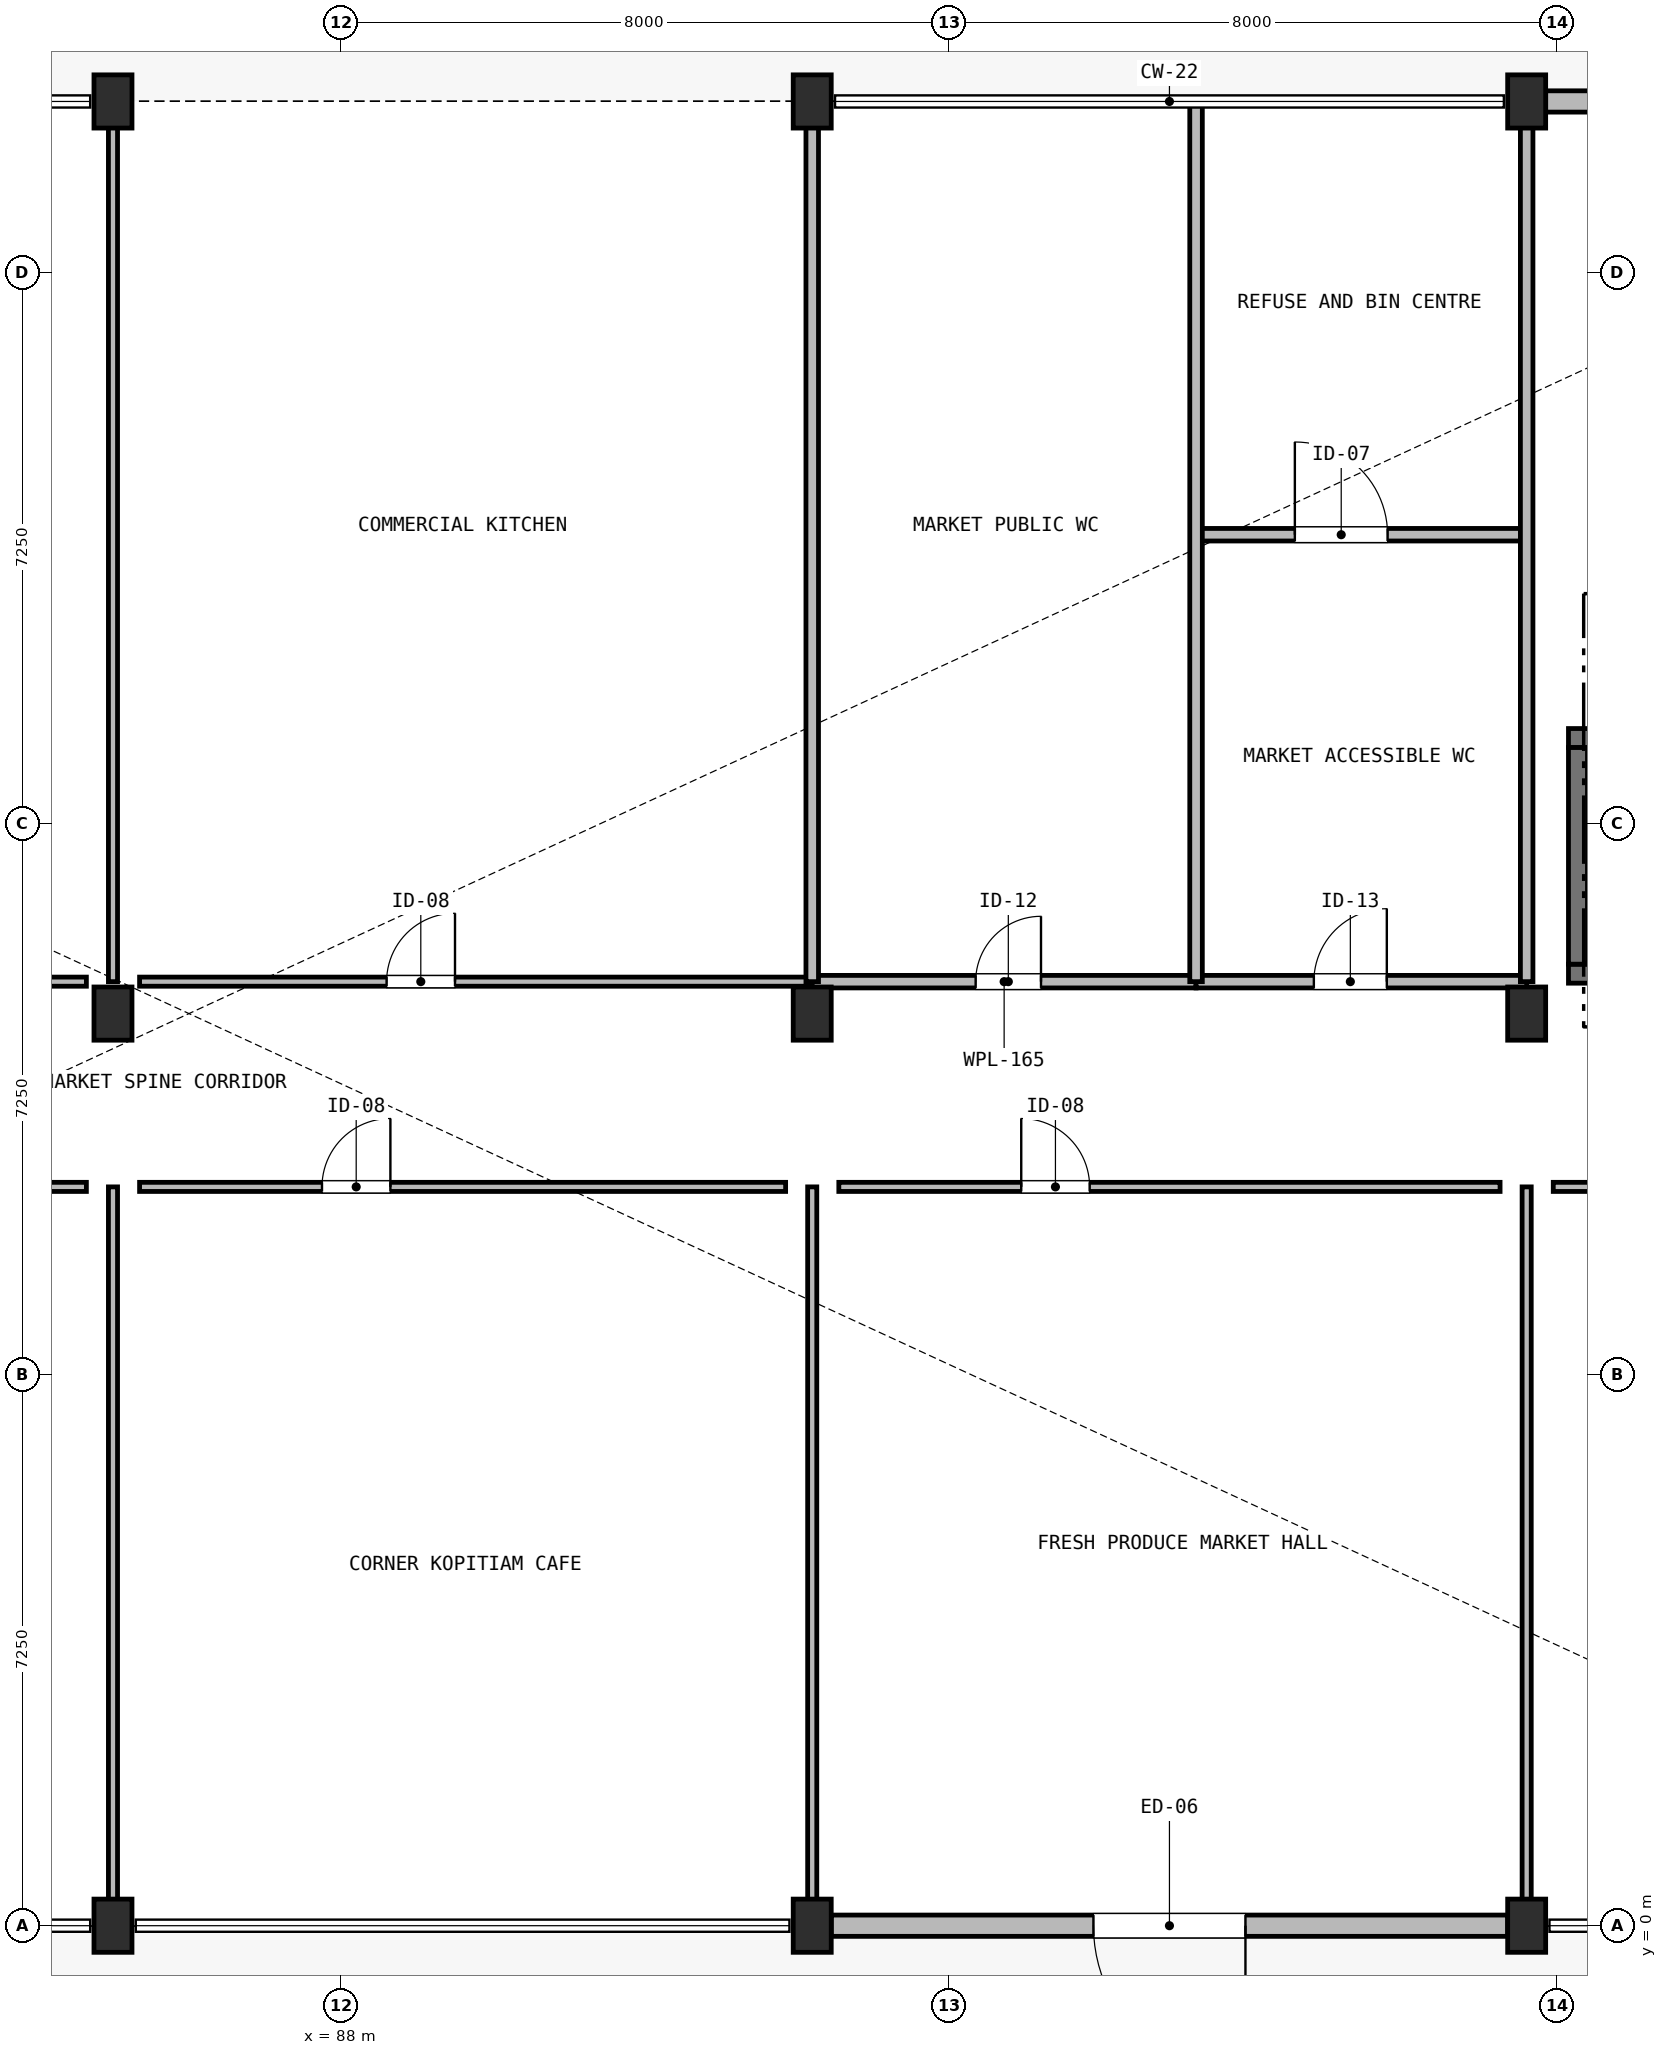
"""IFC4 building model, lengths in metres.
Left out: names, types, materials, properties, quantities, classifications, styles, units other than length and angle.
Written with IfcOpenShell. Run it as: python <this file> out.ifc"""

import sys

from ifc_helpers import new_model, si_unit, direction, frame, frame_2d, origin, origin_2d, place, context, subcontext, project, spatial, rectangle, extrude, element, fill, save


model = new_model("IFC4")
c1 = context("Model", 3, precision=1e-05, world=origin(), true_north=direction((0.0, 1.0)))
c2 = subcontext(c1, "Body", "Model", "MODEL_VIEW")
j1 = project(units=[si_unit("LENGTHUNIT", "METRE"), si_unit("PLANEANGLEUNIT", "RADIAN")], contexts=[c1])
p1 = place(None, origin())
s1 = spatial("IfcSite", under=j1, at=p1, CompositionType="ELEMENT")
p2 = place(p1, origin())
s2 = spatial("IfcBuilding", under=s1, at=p2, CompositionType="ELEMENT")
p3 = place(p2, origin())
s3 = spatial("IfcBuildingStorey", under=s2, at=p3, CompositionType="ELEMENT", Elevation=0.0)
p4 = place(p3, frame((104.15, 12.525, 0.0), z_axis=(0.0, 0.0, 1.0), x_axis=(1.0, 0.0, 0.0)))
e1 = element("IfcWall", 1, at=p4, inside=s3, PredefinedType="SHEAR", context=c2, shape_type="SweptSolid", body=[
    extrude(rectangle(XDim=7.3, YDim=0.25, at=frame_2d((3.65, 0.0))), origin(), (0.0, 0.0, 1.0), 4.5),
])
p5 = place(p4, frame((0.45, 0.0, 0.0)))
e2 = element("IfcOpeningElement", 2, at=p5, cuts=e1, PredefinedType="OPENING", context=c2, shape_type="SweptSolid", body=[
    extrude(rectangle(XDim=1.05, YDim=2.15, at=frame_2d((0.525, 1.075))), frame((0.0, 0.14, 0.0), z_axis=(0.0, -1.0, 0.0), x_axis=(1.0, 0.0, 0.0)), (0.0, 0.0, 1.0), 0.28),
])
p6 = place(p3, frame((104.15, 15.625, 0.0), z_axis=(0.0, 0.0, 1.0), x_axis=(1.0, 0.0, 0.0)))
e3 = element("IfcWall", 3, at=p6, inside=s3, PredefinedType="SHEAR", context=c2, shape_type="SweptSolid", body=[
    extrude(rectangle(XDim=7.3, YDim=0.25, at=frame_2d((3.65, 0.0))), origin(), (0.0, 0.0, 1.0), 4.5),
])
p7 = place(p6, frame((0.45, 0.0, 0.0)))
e4 = element("IfcOpeningElement", 4, at=p7, cuts=e3, PredefinedType="OPENING", context=c2, shape_type="SweptSolid", body=[
    extrude(rectangle(XDim=1.12, YDim=2.15, at=frame_2d((0.56, 1.075))), frame((0.0, 0.14, 0.0), z_axis=(0.0, -1.0, 0.0), x_axis=(1.0, 0.0, 0.0)), (0.0, 0.0, 1.0), 0.28),
])
p8 = place(p3, frame((104.275, 12.65, 0.0), z_axis=(0.0, 0.0, 1.0), x_axis=(0.0, 1.0, 0.0)))
e5 = element("IfcWall", 5, at=p8, inside=s3, PredefinedType="SHEAR", context=c2, shape_type="SweptSolid", body=[
    extrude(rectangle(XDim=2.85, YDim=0.25, at=frame_2d((1.425, 0.0))), origin(), (0.0, 0.0, 1.0), 4.5),
])
for number, where, z_axis, x_axis in (
    (6, (85.0, 0.0, 0.0), (0.0, 0.0, 1.0), (1.0, 0.0, 0.0)),
    (7, (85.0, 12.0, 0.0), (0.0, 0.0, 1.0), (1.0, 0.0, 0.0)),
    (8, (85.0, 24.0, 0.0), (0.0, 0.0, 1.0), (1.0, 0.0, 0.0)),
    (9, (94.2, 0.0, 0.0), (0.0, 0.0, 1.0), (1.0, 0.0, 0.0)),
    (10, (94.2, 12.0, 0.0), (0.0, 0.0, 1.0), (1.0, 0.0, 0.0)),
    (11, (94.2, 24.0, 0.0), (0.0, 0.0, 1.0), (1.0, 0.0, 0.0)),
    (12, (103.6, 0.0, 0.0), (0.0, 0.0, 1.0), (1.0, 0.0, 0.0)),
    (13, (103.6, 12.0, 0.0), (0.0, 0.0, 1.0), (1.0, 0.0, 0.0)),
    (14, (103.6, 24.0, 0.0), (0.0, 0.0, 1.0), (1.0, 0.0, 0.0)),
):
    element("IfcColumn", number, at=place(p3, frame(where, z_axis=z_axis, x_axis=x_axis)), inside=s3, PredefinedType="COLUMN", context=c2, shape_type="SweptSolid", body=[
        extrude(rectangle(XDim=0.5, YDim=0.7, at=origin_2d()), origin(), (0.0, 0.0, 1.0), 4.5),
    ])
p9 = place(p3, frame((103.35, 0.0, 0.0), z_axis=(0.0, 0.0, 1.0), x_axis=(-1.0, 0.0, 0.0)))
e15 = element("IfcWall", 15, at=p9, inside=s3, PredefinedType="SOLIDWALL", context=c2, shape_type="SweptSolid", body=[
    extrude(rectangle(XDim=8.9, YDim=0.28, at=frame_2d((4.45, 0.0))), origin(), (0.0, 0.0, 1.0), 3.59),
])
p10 = place(p9, frame((3.45, 0.0, 0.0)))
e16 = element("IfcOpeningElement", 16, at=p10, cuts=e15, PredefinedType="OPENING", context=c2, shape_type="SweptSolid", body=[
    extrude(rectangle(XDim=2.0, YDim=2.45, at=frame_2d((1.0, 1.225))), frame((0.0, 0.155, 0.0), z_axis=(0.0, -1.0, 0.0), x_axis=(1.0, 0.0, 0.0)), (0.0, 0.0, 1.0), 0.31),
])
p11 = place(p3, frame((103.85, 24.0, 0.0), z_axis=(0.0, 0.0, 1.0), x_axis=(1.0, 0.0, 0.0)))
e17 = element("IfcWall", 17, at=p11, inside=s3, PredefinedType="SOLIDWALL", context=c2, shape_type="SweptSolid", body=[
    extrude(rectangle(XDim=7.9, YDim=0.28, at=frame_2d((3.95, 0.0))), origin(), (0.0, 0.0, 1.0), 3.59),
])
p12 = place(p11, frame((3.4, 0.0, 0.0)))
e18 = element("IfcOpeningElement", 18, at=p12, cuts=e17, PredefinedType="OPENING", context=c2, shape_type="SweptSolid", body=[
    extrude(rectangle(XDim=1.1, YDim=2.15, at=frame_2d((0.55, 1.075))), frame((0.0, 0.155, 0.0), z_axis=(0.0, -1.0, 0.0), x_axis=(1.0, 0.0, 0.0)), (0.0, 0.0, 1.0), 0.31),
])
p13 = place(p3, frame((76.15, 9.72, 0.0), z_axis=(0.0, 0.0, 1.0), x_axis=(1.0, 0.0, 0.0)))
e19 = element("IfcWall", 19, at=p13, inside=s3, PredefinedType="PARTITIONING", context=c2, shape_type="SweptSolid", body=[
    extrude(rectangle(XDim=8.5, YDim=0.12, at=frame_2d((4.25, 0.0))), origin(), (0.0, 0.0, 1.0), 4.23),
])
p14 = place(p13, frame((2.4, 0.0, 0.0)))
e20 = element("IfcOpeningElement", 20, at=p14, cuts=e19, PredefinedType="OPENING", context=c2, shape_type="SweptSolid", body=[
    extrude(rectangle(XDim=0.88, YDim=2.1, at=frame_2d((0.44, 1.05))), frame((0.0, 0.075, 0.0), z_axis=(0.0, -1.0, 0.0), x_axis=(1.0, 0.0, 0.0)), (0.0, 0.0, 1.0), 0.15),
])
p15 = place(p3, frame((85.35, 9.72, 0.0), z_axis=(0.0, 0.0, 1.0), x_axis=(1.0, 0.0, 0.0)))
e21 = element("IfcWall", 21, at=p15, inside=s3, PredefinedType="PARTITIONING", context=c2, shape_type="SweptSolid", body=[
    extrude(rectangle(XDim=8.5, YDim=0.12, at=frame_2d((4.25, 0.0))), origin(), (0.0, 0.0, 1.0), 4.23),
])
p16 = place(p15, frame((2.4, 0.0, 0.0)))
e22 = element("IfcOpeningElement", 22, at=p16, cuts=e21, PredefinedType="OPENING", context=c2, shape_type="SweptSolid", body=[
    extrude(rectangle(XDim=0.9, YDim=2.1, at=frame_2d((0.45, 1.05))), frame((0.0, 0.075, 0.0), z_axis=(0.0, -1.0, 0.0), x_axis=(1.0, 0.0, 0.0)), (0.0, 0.0, 1.0), 0.15),
])
p17 = place(p3, frame((94.55, 9.72, 0.0), z_axis=(0.0, 0.0, 1.0), x_axis=(1.0, 0.0, 0.0)))
e23 = element("IfcWall", 23, at=p17, inside=s3, PredefinedType="PARTITIONING", context=c2, shape_type="SweptSolid", body=[
    extrude(rectangle(XDim=8.7, YDim=0.12, at=frame_2d((4.35, 0.0))), origin(), (0.0, 0.0, 1.0), 4.23),
])
p18 = place(p17, frame((2.4, 0.0, 0.0)))
e24 = element("IfcOpeningElement", 24, at=p18, cuts=e23, PredefinedType="OPENING", context=c2, shape_type="SweptSolid", body=[
    extrude(rectangle(XDim=0.9, YDim=2.1, at=frame_2d((0.45, 1.05))), frame((0.0, 0.075, 0.0), z_axis=(0.0, -1.0, 0.0), x_axis=(1.0, 0.0, 0.0)), (0.0, 0.0, 1.0), 0.15),
])
p19 = place(p3, frame((103.95, 9.72, 0.0), z_axis=(0.0, 0.0, 1.0), x_axis=(1.0, 0.0, 0.0)))
e25 = element("IfcWall", 25, at=p19, inside=s3, PredefinedType="PARTITIONING", context=c2, shape_type="SweptSolid", body=[
    extrude(rectangle(XDim=7.9, YDim=0.12, at=frame_2d((3.95, 0.0))), origin(), (0.0, 0.0, 1.0), 4.23),
])
p20 = place(p19, frame((2.4, 0.0, 0.0)))
e26 = element("IfcOpeningElement", 26, at=p20, cuts=e25, PredefinedType="OPENING", context=c2, shape_type="SweptSolid", body=[
    extrude(rectangle(XDim=0.88, YDim=2.1, at=frame_2d((0.44, 1.05))), frame((0.0, 0.075, 0.0), z_axis=(0.0, -1.0, 0.0), x_axis=(1.0, 0.0, 0.0)), (0.0, 0.0, 1.0), 0.15),
])
for number, where, z_axis, x_axis in (
    (27, (85.0, 0.12, 0.0), (0.0, 0.0, 1.0), (0.0, 1.0, 0.0)),
    (28, (94.2, 0.12, 0.0), (0.0, 0.0, 1.0), (0.0, 1.0, 0.0)),
    (29, (103.6, 0.12, 0.0), (0.0, 0.0, 1.0), (0.0, 1.0, 0.0)),
):
    element("IfcWall", number, at=place(p3, frame(where, z_axis=z_axis, x_axis=x_axis)), inside=s3, PredefinedType="PARTITIONING", context=c2, shape_type="SweptSolid", body=[
        extrude(rectangle(XDim=9.6, YDim=0.12, at=frame_2d((4.8, 0.0))), origin(), (0.0, 0.0, 1.0), 3.6),
    ])
p21 = place(p3, frame((68.4, 12.42, 0.0), z_axis=(0.0, 0.0, 1.0), x_axis=(1.0, 0.0, 0.0)))
e30 = element("IfcWall", 30, at=p21, inside=s3, PredefinedType="PARTITIONING", context=c2, shape_type="SweptSolid", body=[
    extrude(rectangle(XDim=16.25, YDim=0.12, at=frame_2d((8.125, 0.0))), origin(), (0.0, 0.0, 1.0), 4.23),
])
p22 = place(p21, frame((5.4, 0.0, 0.0)))
e31 = element("IfcOpeningElement", 31, at=p22, cuts=e30, PredefinedType="OPENING", context=c2, shape_type="SweptSolid", body=[
    extrude(rectangle(XDim=1.15, YDim=2.15, at=frame_2d((0.575, 1.075))), frame((0.0, 0.075, 0.0), z_axis=(0.0, -1.0, 0.0), x_axis=(1.0, 0.0, 0.0)), (0.0, 0.0, 1.0), 0.15),
])
p23 = place(p3, frame((85.35, 12.42, 0.0), z_axis=(0.0, 0.0, 1.0), x_axis=(1.0, 0.0, 0.0)))
e32 = element("IfcWall", 32, at=p23, inside=s3, PredefinedType="PARTITIONING", context=c2, shape_type="SweptSolid", body=[
    extrude(rectangle(XDim=8.85, YDim=0.12, at=frame_2d((4.425, 0.0))), origin(), (0.0, 0.0, 1.0), 4.23),
])
p24 = place(p23, frame((3.25, 0.0, 0.0)))
e33 = element("IfcOpeningElement", 33, at=p24, cuts=e32, PredefinedType="OPENING", context=c2, shape_type="SweptSolid", body=[
    extrude(rectangle(XDim=0.9, YDim=2.1, at=frame_2d((0.45, 1.05))), frame((0.0, 0.075, 0.0), z_axis=(0.0, -1.0, 0.0), x_axis=(1.0, 0.0, 0.0)), (0.0, 0.0, 1.0), 0.15),
])
p25 = place(p3, frame((94.2, 12.42, 0.0), z_axis=(0.0, 0.0, 1.0), x_axis=(1.0, 0.0, 0.0)))
e34 = element("IfcWall", 34, at=p25, inside=s3, PredefinedType="PLUMBINGWALL", context=c2, shape_type="SweptSolid", body=[
    extrude(rectangle(XDim=5.05, YDim=0.165, at=frame_2d((2.525, 0.0))), origin(), (0.0, 0.0, 1.0), 4.23),
])
p26 = place(p25, frame((2.15, 0.0, 0.0)))
e35 = element("IfcOpeningElement", 35, at=p26, cuts=e34, PredefinedType="OPENING", context=c2, shape_type="SweptSolid", body=[
    extrude(rectangle(XDim=0.86, YDim=2.1, at=frame_2d((0.43, 1.05))), frame((0.0, 0.097, 0.0), z_axis=(0.0, -1.0, 0.0), x_axis=(1.0, 0.0, 0.0)), (0.0, 0.0, 1.0), 0.195),
])
p27 = place(p3, frame((99.25, 12.42, 0.0), z_axis=(0.0, 0.0, 1.0), x_axis=(1.0, 0.0, 0.0)))
e36 = element("IfcWall", 36, at=p27, inside=s3, PredefinedType="PLUMBINGWALL", context=c2, shape_type="SweptSolid", body=[
    extrude(rectangle(XDim=4.35, YDim=0.165, at=frame_2d((2.175, 0.0))), origin(), (0.0, 0.0, 1.0), 4.23),
])
p28 = place(p27, frame((1.55, 0.0, 0.0)))
e37 = element("IfcOpeningElement", 37, at=p28, cuts=e36, PredefinedType="OPENING", context=c2, shape_type="SweptSolid", body=[
    extrude(rectangle(XDim=0.96, YDim=2.12, at=frame_2d((0.48, 1.06))), frame((0.0, 0.097, 0.0), z_axis=(0.0, -1.0, 0.0), x_axis=(1.0, 0.0, 0.0)), (0.0, 0.0, 1.0), 0.195),
])
p29 = place(p3, frame((99.25, 18.3, 0.0), z_axis=(0.0, 0.0, 1.0), x_axis=(1.0, 0.0, 0.0)))
e38 = element("IfcWall", 38, at=p29, inside=s3, PredefinedType="PLUMBINGWALL", context=c2, shape_type="SweptSolid", body=[
    extrude(rectangle(XDim=4.35, YDim=0.165, at=frame_2d((2.175, 0.0))), origin(), (0.0, 0.0, 1.0), 4.23),
])
p30 = place(p29, frame((1.3, 0.0, 0.0)))
e39 = element("IfcOpeningElement", 39, at=p30, cuts=e38, PredefinedType="OPENING", context=c2, shape_type="SweptSolid", body=[
    extrude(rectangle(XDim=1.22, YDim=2.15, at=frame_2d((0.61, 1.075))), frame((0.0, 0.097, 0.0), z_axis=(0.0, -1.0, 0.0), x_axis=(1.0, 0.0, 0.0)), (0.0, 0.0, 1.0), 0.195),
])
p31 = place(p3, frame((85.0, 12.42, 0.0), z_axis=(0.0, 0.0, 1.0), x_axis=(0.0, 1.0, 0.0)))
e40 = element("IfcWall", 40, at=p31, inside=s3, PredefinedType="PARTITIONING", context=c2, shape_type="SweptSolid", body=[
    extrude(rectangle(XDim=11.54, YDim=0.12, at=frame_2d((5.77, 0.0))), origin(), (0.0, 0.0, 1.0), 3.6),
])
p32 = place(p3, frame((94.2, 12.42, 0.0), z_axis=(0.0, 0.0, 1.0), x_axis=(0.0, 1.0, 0.0)))
e41 = element("IfcWall", 41, at=p32, inside=s3, PredefinedType="PLUMBINGWALL", context=c2, shape_type="SweptSolid", body=[
    extrude(rectangle(XDim=11.54, YDim=0.165, at=frame_2d((5.77, 0.0))), origin(), (0.0, 0.0, 1.0), 3.6),
])
p33 = place(p3, frame((99.25, 12.42, 0.0), z_axis=(0.0, 0.0, 1.0), x_axis=(0.0, 1.0, 0.0)))
e42 = element("IfcWall", 42, at=p33, inside=s3, PredefinedType="PLUMBINGWALL", context=c2, shape_type="SweptSolid", body=[
    extrude(rectangle(XDim=11.54, YDim=0.165, at=frame_2d((5.77, 0.0))), origin(), (0.0, 0.0, 1.0), 4.23),
])
p34 = place(p3, frame((103.6, 12.42, 0.0), z_axis=(0.0, 0.0, 1.0), x_axis=(0.0, 1.0, 0.0)))
e43 = element("IfcWall", 43, at=p34, inside=s3, PredefinedType="PLUMBINGWALL", context=c2, shape_type="SweptSolid", body=[
    extrude(rectangle(XDim=11.54, YDim=0.165, at=frame_2d((5.77, 0.0))), origin(), (0.0, 0.0, 1.0), 3.6),
])
p35 = place(p10, origin())
e44 = element("IfcDoor", 44, at=p35, inside=s3, OperationType="DOUBLE_DOOR_SINGLE_SWING", PredefinedType="DOOR", context=c2, shape_type="SweptSolid", body=[
    extrude(rectangle(XDim=2.0, YDim=2.45, at=frame_2d((1.0, 1.225))), frame((0.0, 0.025, 0.0), z_axis=(0.0, -1.0, 0.0), x_axis=(1.0, 0.0, 0.0)), (0.0, 0.0, 1.0), 0.05),
])
fill(e16, e44)
p36 = place(p16, origin())
e45 = element("IfcDoor", 45, at=p36, inside=s3, OperationType="SINGLE_SWING_RIGHT", PredefinedType="DOOR", context=c2, shape_type="SweptSolid", body=[
    extrude(rectangle(XDim=0.9, YDim=2.1, at=frame_2d((0.45, 1.05))), frame((0.0, 0.025, 0.0), z_axis=(0.0, -1.0, 0.0), x_axis=(1.0, 0.0, 0.0)), (0.0, 0.0, 1.0), 0.05),
])
fill(e22, e45)
p37 = place(p18, origin())
e46 = element("IfcDoor", 46, at=p37, inside=s3, OperationType="SINGLE_SWING_LEFT", PredefinedType="DOOR", context=c2, shape_type="SweptSolid", body=[
    extrude(rectangle(XDim=0.9, YDim=2.1, at=frame_2d((0.45, 1.05))), frame((0.0, 0.025, 0.0), z_axis=(0.0, -1.0, 0.0), x_axis=(1.0, 0.0, 0.0)), (0.0, 0.0, 1.0), 0.05),
])
fill(e24, e46)
p38 = place(p24, origin())
e47 = element("IfcDoor", 47, at=p38, inside=s3, OperationType="SINGLE_SWING_RIGHT", PredefinedType="DOOR", context=c2, shape_type="SweptSolid", body=[
    extrude(rectangle(XDim=0.9, YDim=2.1, at=frame_2d((0.45, 1.05))), frame((0.0, 0.025, 0.0), z_axis=(0.0, -1.0, 0.0), x_axis=(1.0, 0.0, 0.0)), (0.0, 0.0, 1.0), 0.05),
])
fill(e33, e47)
p39 = place(p26, origin())
e48 = element("IfcDoor", 48, at=p39, inside=s3, OperationType="SINGLE_SWING_RIGHT", PredefinedType="DOOR", context=c2, shape_type="SweptSolid", body=[
    extrude(rectangle(XDim=0.86, YDim=2.1, at=frame_2d((0.43, 1.05))), frame((0.0, 0.025, 0.0), z_axis=(0.0, -1.0, 0.0), x_axis=(1.0, 0.0, 0.0)), (0.0, 0.0, 1.0), 0.05),
])
fill(e35, e48)
p40 = place(p28, origin())
e49 = element("IfcDoor", 49, at=p40, inside=s3, OperationType="SINGLE_SWING_RIGHT", PredefinedType="DOOR", context=c2, shape_type="SweptSolid", body=[
    extrude(rectangle(XDim=0.96, YDim=2.12, at=frame_2d((0.48, 1.06))), frame((0.0, 0.025, 0.0), z_axis=(0.0, -1.0, 0.0), x_axis=(1.0, 0.0, 0.0)), (0.0, 0.0, 1.0), 0.05),
])
fill(e37, e49)
p41 = place(p30, origin())
e50 = element("IfcDoor", 50, at=p41, inside=s3, OperationType="SINGLE_SWING_LEFT", PredefinedType="DOOR", context=c2, shape_type="SweptSolid", body=[
    extrude(rectangle(XDim=1.22, YDim=2.15, at=frame_2d((0.61, 1.075))), frame((0.0, 0.025, 0.0), z_axis=(0.0, -1.0, 0.0), x_axis=(1.0, 0.0, 0.0)), (0.0, 0.0, 1.0), 0.05),
])
fill(e39, e50)
save(model, sys.argv[1])
